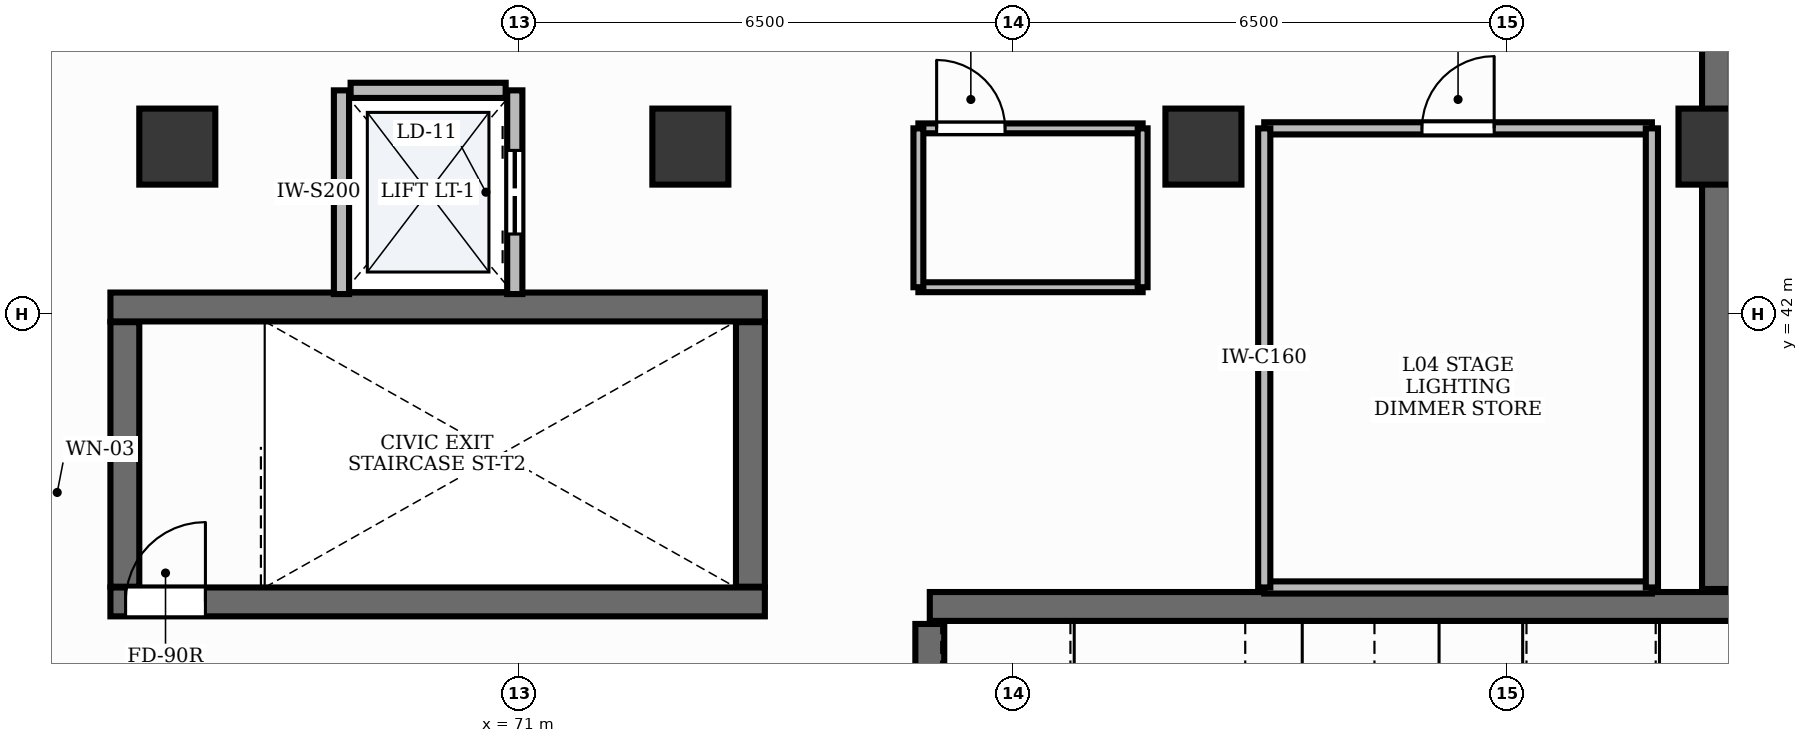
"""IFC4 building model, lengths in metres.
Left out: names, types, materials, properties, quantities, classifications, styles, units other than length and angle.
Written with IfcOpenShell. Run it as: python <this file> out.ifc"""

import sys

from ifc_helpers import new_model, si_unit, direction, frame, frame_2d, origin, origin_2d, place, context, subcontext, project, spatial, rectangle, extrude, element, fill, save


model = new_model("IFC4")
c1 = context("Model", 3, precision=1e-05, world=origin(), true_north=direction((0.0, 1.0)))
c2 = subcontext(c1, "Body", "Model", "MODEL_VIEW")
j1 = project(units=[si_unit("LENGTHUNIT", "METRE"), si_unit("PLANEANGLEUNIT", "RADIAN")], contexts=[c1])
p1 = place(None, origin())
s1 = spatial("IfcSite", under=j1, at=p1, CompositionType="ELEMENT")
p2 = place(p1, origin())
s2 = spatial("IfcBuilding", under=s1, at=p2, CompositionType="ELEMENT")
p3 = place(p2, frame((0.0, 0.0, 20.4)))
s3 = spatial("IfcBuildingStorey", under=s2, at=p3, CompositionType="ELEMENT", Elevation=20.4)
for number, where, z_axis, x_axis in (
    (1, (66.5, 44.2, 0.0), (0.0, 0.0, 1.0), (1.0, 0.0, 0.0)),
    (2, (73.25, 44.2, 0.0), (0.0, 0.0, 1.0), (1.0, 0.0, 0.0)),
    (3, (80.0, 44.2, 0.0), (0.0, 0.0, 1.0), (1.0, 0.0, 0.0)),
    (4, (86.75, 44.2, 0.0), (0.0, 0.0, 1.0), (1.0, 0.0, 0.0)),
):
    element("IfcColumn", number, at=place(p3, frame(where, z_axis=z_axis, x_axis=x_axis)), inside=s3, PredefinedType="COLUMN", context=c2, shape_type="SweptSolid", body=[
        extrude(rectangle(XDim=1.0, YDim=1.0, at=origin_2d()), origin(), (0.0, 0.0, 1.0), 5.4),
    ])
p4 = place(p3, frame((86.75, 38.38, 0.0), z_axis=(0.0, 0.0, 1.0), x_axis=(0.0, 1.0, 0.0)))
e5 = element("IfcWall", 5, at=p4, inside=s3, PredefinedType="SHEAR", context=c2, shape_type="SweptSolid", body=[
    extrude(rectangle(XDim=8.41, YDim=0.38, at=frame_2d((4.205, 0.0))), origin(), (0.0, 0.0, 1.0), 5.4),
])
p5 = place(p3, frame((76.4, 38.15, 0.0), z_axis=(0.0, 0.0, 1.0), x_axis=(1.0, 0.0, 0.0)))
e6 = element("IfcWall", 6, at=p5, inside=s3, PredefinedType="SHEAR", context=c2, shape_type="SweptSolid", body=[
    extrude(rectangle(XDim=15.75, YDim=0.38, at=frame_2d((7.875, 0.0))), origin(), (0.0, 0.0, 1.0), 5.4),
])
p6 = place(p3, frame((76.4, 16.08, 0.0), z_axis=(0.0, 0.0, 1.0), x_axis=(0.0, 1.0, 0.0)))
e7 = element("IfcWall", 7, at=p6, inside=s3, PredefinedType="SHEAR", context=c2, shape_type="SweptSolid", body=[
    extrude(rectangle(XDim=21.84, YDim=0.38, at=frame_2d((10.92, 0.0))), origin(), (0.0, 0.0, 1.0), 5.4),
])
p7 = place(p3, frame((65.62, 38.21, 0.0), z_axis=(0.0, 0.0, 1.0), x_axis=(1.0, 0.0, 0.0)))
e8 = element("IfcWall", 8, at=p7, inside=s3, PredefinedType="SHEAR", context=c2, shape_type="SweptSolid", body=[
    extrude(rectangle(XDim=8.61, YDim=0.38, at=frame_2d((4.305, 0.0))), origin(), (0.0, 0.0, 1.0), 5.4),
])
p8 = place(p7, frame((0.2, 0.0, 0.0)))
e9 = element("IfcOpeningElement", 9, at=p8, cuts=e8, PredefinedType="OPENING", context=c2, shape_type="SweptSolid", body=[
    extrude(rectangle(XDim=1.05, YDim=2.15, at=frame_2d((0.525, 1.075))), frame((0.0, 0.205, 0.0), z_axis=(0.0, -1.0, 0.0), x_axis=(1.0, 0.0, 0.0)), (0.0, 0.0, 1.0), 0.41),
])
p9 = place(p3, frame((65.62, 42.09, 0.0), z_axis=(0.0, 0.0, 1.0), x_axis=(1.0, 0.0, 0.0)))
e10 = element("IfcWall", 10, at=p9, inside=s3, PredefinedType="SHEAR", context=c2, shape_type="SweptSolid", body=[
    extrude(rectangle(XDim=8.61, YDim=0.38, at=frame_2d((4.305, 0.0))), origin(), (0.0, 0.0, 1.0), 5.4),
])
for number, where, z_axis, x_axis in (
    (11, (74.04, 38.41, 0.0), (0.0, 0.0, 1.0), (0.0, 1.0, 0.0)),
    (12, (65.81, 38.41, 0.0), (0.0, 0.0, 1.0), (0.0, 1.0, 0.0)),
):
    element("IfcWall", number, at=place(p3, frame(where, z_axis=z_axis, x_axis=x_axis)), inside=s3, PredefinedType="SHEAR", context=c2, shape_type="SweptSolid", body=[
        extrude(rectangle(XDim=3.48, YDim=0.38, at=frame_2d((1.74, 0.0))), origin(), (0.0, 0.0, 1.0), 5.4),
    ])
p10 = place(p3, frame((68.66, 42.26, 0.0), z_axis=(0.0, 0.0, 1.0), x_axis=(0.0, 1.0, 0.0)))
e13 = element("IfcWall", 13, at=p10, inside=s3, PredefinedType="PARTITIONING", context=c2, shape_type="SweptSolid", body=[
    extrude(rectangle(XDim=2.68, YDim=0.2, at=frame_2d((1.34, 0.0))), origin(), (0.0, 0.0, 1.0), 4.11),
])
p11 = place(p3, frame((70.94, 42.26, 0.0), z_axis=(0.0, 0.0, 1.0), x_axis=(0.0, 1.0, 0.0)))
e14 = element("IfcWall", 14, at=p11, inside=s3, PredefinedType="PARTITIONING", context=c2, shape_type="SweptSolid", body=[
    extrude(rectangle(XDim=2.68, YDim=0.2, at=frame_2d((1.34, 0.0))), origin(), (0.0, 0.0, 1.0), 4.11),
])
p12 = place(p11, frame((0.79, 0.0, 0.0)))
e15 = element("IfcOpeningElement", 15, at=p12, cuts=e14, PredefinedType="OPENING", context=c2, shape_type="SweptSolid", body=[
    extrude(rectangle(XDim=1.1, YDim=2.2, at=frame_2d((0.55, 1.1))), frame((0.0, 0.115, 0.0), z_axis=(0.0, -1.0, 0.0), x_axis=(1.0, 0.0, 0.0)), (0.0, 0.0, 1.0), 0.23),
])
p13 = place(p3, frame((68.78, 44.94, 0.0), z_axis=(0.0, 0.0, 1.0), x_axis=(1.0, 0.0, 0.0)))
e16 = element("IfcWall", 16, at=p13, inside=s3, PredefinedType="PARTITIONING", context=c2, shape_type="SweptSolid", body=[
    extrude(rectangle(XDim=2.04, YDim=0.2, at=frame_2d((1.02, 0.0))), origin(), (0.0, 0.0, 1.0), 4.11),
])
p14 = place(p3, frame((76.25, 44.44, 0.0), z_axis=(0.0, 0.0, 1.0), x_axis=(1.0, 0.0, 0.0)))
e17 = element("IfcWall", 17, at=p14, inside=s3, PredefinedType="PARTITIONING", context=c2, shape_type="SweptSolid", body=[
    extrude(rectangle(XDim=2.95, YDim=0.13, at=frame_2d((1.475, 0.0))), origin(), (0.0, 0.0, 1.0), 4.11),
])
p15 = place(p14, frame((0.24, 0.0, 0.0)))
e18 = element("IfcOpeningElement", 18, at=p15, cuts=e17, PredefinedType="OPENING", context=c2, shape_type="SweptSolid", body=[
    extrude(rectangle(XDim=0.9, YDim=2.15, at=frame_2d((0.45, 1.075))), frame((0.0, 0.08, 0.0), z_axis=(0.0, -1.0, 0.0), x_axis=(1.0, 0.0, 0.0)), (0.0, 0.0, 1.0), 0.16),
])
p16 = place(p3, frame((80.8, 44.44, 0.0), z_axis=(0.0, 0.0, 1.0), x_axis=(1.0, 0.0, 0.0)))
e19 = element("IfcWall", 19, at=p16, inside=s3, PredefinedType="PARTITIONING", context=c2, shape_type="SweptSolid", body=[
    extrude(rectangle(XDim=5.1, YDim=0.16, at=frame_2d((2.55, 0.0))), origin(), (0.0, 0.0, 1.0), 4.11),
])
p17 = place(p16, frame((2.075, 0.0, 0.0)))
e20 = element("IfcOpeningElement", 20, at=p17, cuts=e19, PredefinedType="OPENING", context=c2, shape_type="SweptSolid", body=[
    extrude(rectangle(XDim=0.95, YDim=2.15, at=frame_2d((0.475, 1.075))), frame((0.0, 0.095, 0.0), z_axis=(0.0, -1.0, 0.0), x_axis=(1.0, 0.0, 0.0)), (0.0, 0.0, 1.0), 0.19),
])
p18 = place(p3, frame((79.2, 42.35, 0.0), z_axis=(0.0, 0.0, 1.0), x_axis=(-1.0, 0.0, 0.0)))
e21 = element("IfcWall", 21, at=p18, inside=s3, PredefinedType="PARTITIONING", context=c2, shape_type="SweptSolid", body=[
    extrude(rectangle(XDim=2.95, YDim=0.13, at=frame_2d((1.475, 0.0))), origin(), (0.0, 0.0, 1.0), 4.11),
])
p19 = place(p3, frame((76.25, 42.35, 0.0), z_axis=(0.0, 0.0, 1.0), x_axis=(0.0, 1.0, 0.0)))
e22 = element("IfcWall", 22, at=p19, inside=s3, PredefinedType="PARTITIONING", context=c2, shape_type="SweptSolid", body=[
    extrude(rectangle(XDim=2.09, YDim=0.13, at=frame_2d((1.045, 0.0))), origin(), (0.0, 0.0, 1.0), 4.11),
])
p20 = place(p3, frame((79.2, 44.44, 0.0), z_axis=(0.0, 0.0, 1.0), x_axis=(0.0, -1.0, 0.0)))
e23 = element("IfcWall", 23, at=p20, inside=s3, PredefinedType="PARTITIONING", context=c2, shape_type="SweptSolid", body=[
    extrude(rectangle(XDim=2.09, YDim=0.13, at=frame_2d((1.045, 0.0))), origin(), (0.0, 0.0, 1.0), 2.22),
])
p21 = place(p3, frame((85.9, 38.4, 0.0), z_axis=(0.0, 0.0, 1.0), x_axis=(-1.0, 0.0, 0.0)))
e24 = element("IfcWall", 24, at=p21, inside=s3, PredefinedType="PARTITIONING", context=c2, shape_type="SweptSolid", body=[
    extrude(rectangle(XDim=5.1, YDim=0.16, at=frame_2d((2.55, 0.0))), origin(), (0.0, 0.0, 1.0), 4.11),
])
p22 = place(p3, frame((80.8, 38.4, 0.0), z_axis=(0.0, 0.0, 1.0), x_axis=(0.0, 1.0, 0.0)))
e25 = element("IfcWall", 25, at=p22, inside=s3, PredefinedType="PARTITIONING", context=c2, shape_type="SweptSolid", body=[
    extrude(rectangle(XDim=6.04, YDim=0.16, at=frame_2d((3.02, 0.0))), origin(), (0.0, 0.0, 1.0), 2.22),
])
p23 = place(p3, frame((85.9, 44.44, 0.0), z_axis=(0.0, 0.0, 1.0), x_axis=(0.0, -1.0, 0.0)))
e26 = element("IfcWall", 26, at=p23, inside=s3, PredefinedType="PARTITIONING", context=c2, shape_type="SweptSolid", body=[
    extrude(rectangle(XDim=6.04, YDim=0.16, at=frame_2d((3.02, 0.0))), origin(), (0.0, 0.0, 1.0), 4.11),
])
p24 = place(p8, origin())
e27 = element("IfcDoor", 27, at=p24, inside=s3, OperationType="SINGLE_SWING_RIGHT", PredefinedType="DOOR", context=c2, shape_type="SweptSolid", body=[
    extrude(rectangle(XDim=1.05, YDim=2.15, at=frame_2d((0.525, 1.075))), frame((0.0, 0.025, 0.0), z_axis=(0.0, -1.0, 0.0), x_axis=(1.0, 0.0, 0.0)), (0.0, 0.0, 1.0), 0.05),
])
fill(e9, e27)
p25 = place(p12, origin())
e28 = element("IfcDoor", 28, at=p25, inside=s3, OperationType="DOUBLE_DOOR_SLIDING", PredefinedType="DOOR", context=c2, shape_type="SweptSolid", body=[
    extrude(rectangle(XDim=1.1, YDim=2.2, at=frame_2d((0.55, 1.1))), frame((0.0, 0.025, 0.0), z_axis=(0.0, -1.0, 0.0), x_axis=(1.0, 0.0, 0.0)), (0.0, 0.0, 1.0), 0.05),
])
fill(e15, e28)
p26 = place(p15, origin())
e29 = element("IfcDoor", 29, at=p26, inside=s3, OperationType="SINGLE_SWING_LEFT", PredefinedType="DOOR", context=c2, shape_type="SweptSolid", body=[
    extrude(rectangle(XDim=0.9, YDim=2.15, at=frame_2d((0.45, 1.075))), frame((0.0, 0.025, 0.0), z_axis=(0.0, -1.0, 0.0), x_axis=(1.0, 0.0, 0.0)), (0.0, 0.0, 1.0), 0.05),
])
fill(e18, e29)
p27 = place(p17, origin())
e30 = element("IfcDoor", 30, at=p27, inside=s3, OperationType="SINGLE_SWING_RIGHT", PredefinedType="DOOR", context=c2, shape_type="SweptSolid", body=[
    extrude(rectangle(XDim=0.95, YDim=2.15, at=frame_2d((0.475, 1.075))), frame((0.0, 0.025, 0.0), z_axis=(0.0, -1.0, 0.0), x_axis=(1.0, 0.0, 0.0)), (0.0, 0.0, 1.0), 0.05),
])
fill(e20, e30)
save(model, sys.argv[1])
